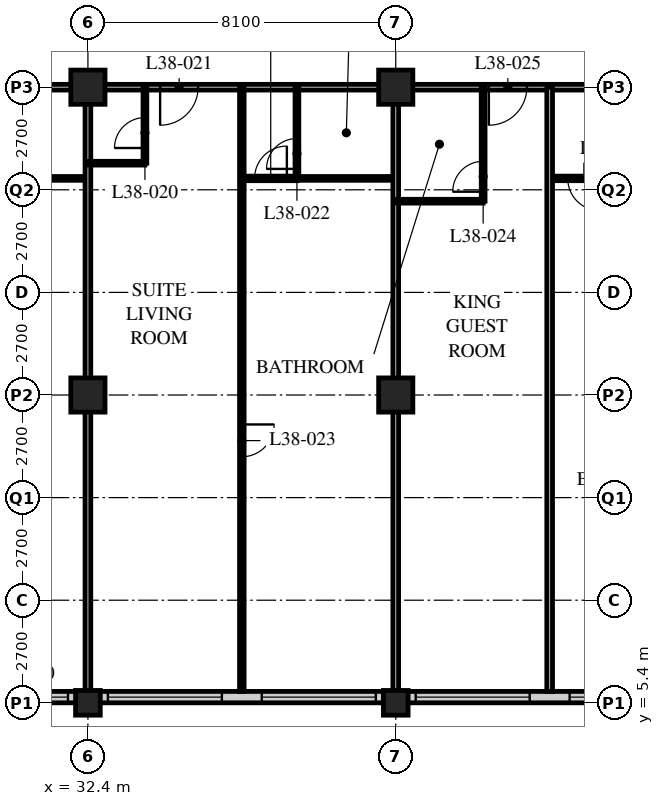
"""IFC4 building model, lengths in metres.
Left out: names, types, materials, properties, quantities, classifications, styles, units other than length and angle.
Written with IfcOpenShell. Run it as: python <this file> out.ifc"""

import sys

from ifc_helpers import new_model, si_unit, direction, frame, frame_2d, origin, origin_2d, place, context, subcontext, project, spatial, rectangle, hollow_rectangle, extrude, element, fill, save


model = new_model("IFC4")
c1 = context("Model", 3, precision=1e-05, world=origin(), true_north=direction((0.0, 1.0)))
c2 = subcontext(c1, "Body", "Model", "MODEL_VIEW")
j1 = project(units=[si_unit("LENGTHUNIT", "METRE"), si_unit("PLANEANGLEUNIT", "RADIAN")], contexts=[c1])
p1 = place(None, origin())
s1 = spatial("IfcSite", under=j1, at=p1, CompositionType="ELEMENT")
p2 = place(p1, origin())
s2 = spatial("IfcBuilding", under=s1, at=p2, CompositionType="ELEMENT")
p3 = place(p2, frame((0.0, 0.0, 147.6)))
s3 = spatial("IfcBuildingStorey", under=s2, at=p3, CompositionType="ELEMENT", Elevation=147.6)
p4 = place(p3, frame((32.4, 5.4, 0.0), z_axis=(0.0, 0.0, 1.0), x_axis=(1.0, 0.0, 0.0)))
e1 = element("IfcColumn", 1, at=p4, inside=s3, PredefinedType="COLUMN", context=c2, shape_type="SweptSolid", body=[
    extrude(hollow_rectangle(XDim=0.65, YDim=0.65, WallThickness=0.055, at=origin_2d()), origin(), (0.0, 0.0, 1.0), 3.4),
])
for number, where, z_axis, x_axis in (
    (2, (32.4, 13.5, 0.0), (0.0, 0.0, 1.0), (1.0, 0.0, 0.0)),
    (3, (32.4, 21.6, 0.0), (0.0, 0.0, 1.0), (1.0, 0.0, 0.0)),
):
    element("IfcColumn", number, at=place(p3, frame(where, z_axis=z_axis, x_axis=x_axis)), inside=s3, PredefinedType="COLUMN", context=c2, shape_type="SweptSolid", body=[
        extrude(hollow_rectangle(XDim=0.9, YDim=0.9, WallThickness=0.1, at=origin_2d()), origin(), (0.0, 0.0, 1.0), 3.4),
    ])
p5 = place(p3, frame((40.5, 5.4, 0.0), z_axis=(0.0, 0.0, 1.0), x_axis=(1.0, 0.0, 0.0)))
e4 = element("IfcColumn", 4, at=p5, inside=s3, PredefinedType="COLUMN", context=c2, shape_type="SweptSolid", body=[
    extrude(hollow_rectangle(XDim=0.65, YDim=0.65, WallThickness=0.055, at=origin_2d()), origin(), (0.0, 0.0, 1.0), 3.4),
])
for number, where, z_axis, x_axis in (
    (5, (40.5, 13.5, 0.0), (0.0, 0.0, 1.0), (1.0, 0.0, 0.0)),
    (6, (40.5, 21.6, 0.0), (0.0, 0.0, 1.0), (1.0, 0.0, 0.0)),
):
    element("IfcColumn", number, at=place(p3, frame(where, z_axis=z_axis, x_axis=x_axis)), inside=s3, PredefinedType="COLUMN", context=c2, shape_type="SweptSolid", body=[
        extrude(hollow_rectangle(XDim=0.9, YDim=0.9, WallThickness=0.1, at=origin_2d()), origin(), (0.0, 0.0, 1.0), 3.4),
    ])
p6 = place(p3, frame((8.4, 5.55, 0.0), z_axis=(0.0, 0.0, 1.0), x_axis=(1.0, 0.0, 0.0)))
e7 = element("IfcWall", 7, at=p6, inside=s3, PredefinedType="SOLIDWALL", context=c2, shape_type="SweptSolid", body=[
    extrude(rectangle(XDim=40.2, YDim=0.3, at=frame_2d((20.1, 0.0))), origin(), (0.0, 0.0, 1.0), 3.19),
])
p7 = place(p6, frame((0.225, 0.0, 0.9)))
e8 = element("IfcOpeningElement", 8, at=p7, cuts=e7, PredefinedType="OPENING", context=c2, shape_type="SweptSolid", body=[
    extrude(rectangle(XDim=3.0, YDim=1.4, at=frame_2d((1.5, 0.7))), frame((0.0, 0.16, 0.0), z_axis=(0.0, -1.0, 0.0), x_axis=(1.0, 0.0, 0.0)), (0.0, 0.0, 1.0), 0.32),
])
p8 = place(p6, frame((4.275, 0.0, 0.9)))
e9 = element("IfcOpeningElement", 9, at=p8, cuts=e7, PredefinedType="OPENING", context=c2, shape_type="SweptSolid", body=[
    extrude(rectangle(XDim=3.0, YDim=1.4, at=frame_2d((1.5, 0.7))), frame((0.0, 0.16, 0.0), z_axis=(0.0, -1.0, 0.0), x_axis=(1.0, 0.0, 0.0)), (0.0, 0.0, 1.0), 0.32),
])
p9 = place(p6, frame((8.325, 0.0, 0.9)))
e10 = element("IfcOpeningElement", 10, at=p9, cuts=e7, PredefinedType="OPENING", context=c2, shape_type="SweptSolid", body=[
    extrude(rectangle(XDim=3.0, YDim=1.4, at=frame_2d((1.5, 0.7))), frame((0.0, 0.16, 0.0), z_axis=(0.0, -1.0, 0.0), x_axis=(1.0, 0.0, 0.0)), (0.0, 0.0, 1.0), 0.32),
])
p10 = place(p6, frame((12.375, 0.0, 0.9)))
e11 = element("IfcOpeningElement", 11, at=p10, cuts=e7, PredefinedType="OPENING", context=c2, shape_type="SweptSolid", body=[
    extrude(rectangle(XDim=3.0, YDim=1.4, at=frame_2d((1.5, 0.7))), frame((0.0, 0.16, 0.0), z_axis=(0.0, -1.0, 0.0), x_axis=(1.0, 0.0, 0.0)), (0.0, 0.0, 1.0), 0.32),
])
p11 = place(p6, frame((16.425, 0.0, 0.9)))
e12 = element("IfcOpeningElement", 12, at=p11, cuts=e7, PredefinedType="OPENING", context=c2, shape_type="SweptSolid", body=[
    extrude(rectangle(XDim=3.0, YDim=1.4, at=frame_2d((1.5, 0.7))), frame((0.0, 0.16, 0.0), z_axis=(0.0, -1.0, 0.0), x_axis=(1.0, 0.0, 0.0)), (0.0, 0.0, 1.0), 0.32),
])
p12 = place(p6, frame((20.475, 0.0, 0.9)))
e13 = element("IfcOpeningElement", 13, at=p12, cuts=e7, PredefinedType="OPENING", context=c2, shape_type="SweptSolid", body=[
    extrude(rectangle(XDim=3.0, YDim=1.4, at=frame_2d((1.5, 0.7))), frame((0.0, 0.16, 0.0), z_axis=(0.0, -1.0, 0.0), x_axis=(1.0, 0.0, 0.0)), (0.0, 0.0, 1.0), 0.32),
])
p13 = place(p6, frame((24.525, 0.0, 0.9)))
e14 = element("IfcOpeningElement", 14, at=p13, cuts=e7, PredefinedType="OPENING", context=c2, shape_type="SweptSolid", body=[
    extrude(rectangle(XDim=3.0, YDim=1.4, at=frame_2d((1.5, 0.7))), frame((0.0, 0.16, 0.0), z_axis=(0.0, -1.0, 0.0), x_axis=(1.0, 0.0, 0.0)), (0.0, 0.0, 1.0), 0.32),
])
p14 = place(p6, frame((28.575, 0.0, 0.9)))
e15 = element("IfcOpeningElement", 15, at=p14, cuts=e7, PredefinedType="OPENING", context=c2, shape_type="SweptSolid", body=[
    extrude(rectangle(XDim=3.0, YDim=1.4, at=frame_2d((1.5, 0.7))), frame((0.0, 0.16, 0.0), z_axis=(0.0, -1.0, 0.0), x_axis=(1.0, 0.0, 0.0)), (0.0, 0.0, 1.0), 0.32),
])
p15 = place(p6, frame((32.625, 0.0, 0.9)))
e16 = element("IfcOpeningElement", 16, at=p15, cuts=e7, PredefinedType="OPENING", context=c2, shape_type="SweptSolid", body=[
    extrude(rectangle(XDim=3.0, YDim=1.4, at=frame_2d((1.5, 0.7))), frame((0.0, 0.16, 0.0), z_axis=(0.0, -1.0, 0.0), x_axis=(1.0, 0.0, 0.0)), (0.0, 0.0, 1.0), 0.32),
])
p16 = place(p6, frame((36.675, 0.0, 0.9)))
e17 = element("IfcOpeningElement", 17, at=p16, cuts=e7, PredefinedType="OPENING", context=c2, shape_type="SweptSolid", body=[
    extrude(rectangle(XDim=3.0, YDim=1.4, at=frame_2d((1.5, 0.7))), frame((0.0, 0.16, 0.0), z_axis=(0.0, -1.0, 0.0), x_axis=(1.0, 0.0, 0.0)), (0.0, 0.0, 1.0), 0.32),
])
p17 = place(p3, frame((12.15, 21.6, 0.0), z_axis=(0.0, 0.0, 1.0), x_axis=(1.0, 0.0, 0.0)))
e18 = element("IfcWall", 18, at=p17, inside=s3, PredefinedType="PARTITIONING", context=c2, shape_type="SweptSolid", body=[
    extrude(rectangle(XDim=36.45, YDim=0.15, at=frame_2d((18.225, 0.0))), origin(), (0.0, 0.0, 1.0), 2.42),
])
p18 = place(p17, frame((5.95, 0.0, 0.0)))
e19 = element("IfcOpeningElement", 19, at=p18, cuts=e18, PredefinedType="OPENING", context=c2, shape_type="SweptSolid", body=[
    extrude(rectangle(XDim=1.0, YDim=2.1, at=frame_2d((0.5, 1.05))), frame((0.0, 0.085, 0.0), z_axis=(0.0, -1.0, 0.0), x_axis=(1.0, 0.0, 0.0)), (0.0, 0.0, 1.0), 0.17),
])
p19 = place(p17, frame((14.05, 0.0, 0.0)))
e20 = element("IfcOpeningElement", 20, at=p19, cuts=e18, PredefinedType="OPENING", context=c2, shape_type="SweptSolid", body=[
    extrude(rectangle(XDim=1.0, YDim=2.1, at=frame_2d((0.5, 1.05))), frame((0.0, 0.085, 0.0), z_axis=(0.0, -1.0, 0.0), x_axis=(1.0, 0.0, 0.0)), (0.0, 0.0, 1.0), 0.17),
])
p20 = place(p17, frame((22.15, 0.0, 0.0)))
e21 = element("IfcOpeningElement", 21, at=p20, cuts=e18, PredefinedType="OPENING", context=c2, shape_type="SweptSolid", body=[
    extrude(rectangle(XDim=1.0, YDim=2.1, at=frame_2d((0.5, 1.05))), frame((0.0, 0.085, 0.0), z_axis=(0.0, -1.0, 0.0), x_axis=(1.0, 0.0, 0.0)), (0.0, 0.0, 1.0), 0.17),
])
p21 = place(p17, frame((30.8, 0.0, 0.0)))
e22 = element("IfcOpeningElement", 22, at=p21, cuts=e18, PredefinedType="OPENING", context=c2, shape_type="SweptSolid", body=[
    extrude(rectangle(XDim=1.0, YDim=2.1, at=frame_2d((0.5, 1.05))), frame((0.0, 0.085, 0.0), z_axis=(0.0, -1.0, 0.0), x_axis=(1.0, 0.0, 0.0)), (0.0, 0.0, 1.0), 0.17),
])
p22 = place(p17, frame((1.525, 0.0, 0.0)))
e23 = element("IfcOpeningElement", 23, at=p22, cuts=e18, PredefinedType="OPENING", context=c2, shape_type="SweptSolid", body=[
    extrude(rectangle(XDim=1.0, YDim=2.1, at=frame_2d((0.5, 1.05))), frame((0.0, 0.085, 0.0), z_axis=(0.0, -1.0, 0.0), x_axis=(1.0, 0.0, 0.0)), (0.0, 0.0, 1.0), 0.17),
])
p23 = place(p17, frame((33.925, 0.0, 0.0)))
e24 = element("IfcOpeningElement", 24, at=p23, cuts=e18, PredefinedType="OPENING", context=c2, shape_type="SweptSolid", body=[
    extrude(rectangle(XDim=1.0, YDim=2.1, at=frame_2d((0.5, 1.05))), frame((0.0, 0.085, 0.0), z_axis=(0.0, -1.0, 0.0), x_axis=(1.0, 0.0, 0.0)), (0.0, 0.0, 1.0), 0.17),
])
p24 = place(p3, frame((29.8, 19.2, 0.0), z_axis=(0.0, 0.0, 1.0), x_axis=(1.0, 0.0, 0.0)))
e25 = element("IfcWall", 25, at=p24, inside=s3, PredefinedType="PARTITIONING", context=c2, shape_type="SweptSolid", body=[
    extrude(rectangle(XDim=2.6, YDim=0.1, at=frame_2d((1.3, 0.0))), origin(), (0.0, 0.0, 1.0), 3.19),
])
p25 = place(p3, frame((32.4, 21.6, 0.0), z_axis=(0.0, 0.0, 1.0), x_axis=(0.0, -1.0, 0.0)))
e26 = element("IfcWall", 26, at=p25, inside=s3, PredefinedType="PARTITIONING", context=c2, shape_type="SweptSolid", body=[
    extrude(rectangle(XDim=15.9, YDim=0.15, at=frame_2d((7.95, 0.0))), origin(), (0.0, 0.0, 1.0), 2.42),
])
p26 = place(p3, frame((32.4, 19.6, 0.0), z_axis=(0.0, 0.0, 1.0), x_axis=(1.0, 0.0, 0.0)))
e27 = element("IfcWall", 27, at=p26, inside=s3, PredefinedType="PARTITIONING", context=c2, shape_type="SweptSolid", body=[
    extrude(rectangle(XDim=1.5, YDim=0.1, at=frame_2d((0.75, 0.0))), origin(), (0.0, 0.0, 1.0), 3.19),
])
p27 = place(p3, frame((33.9, 21.6, 0.0), z_axis=(0.0, 0.0, 1.0), x_axis=(0.0, -1.0, 0.0)))
e28 = element("IfcWall", 28, at=p27, inside=s3, PredefinedType="PARTITIONING", context=c2, shape_type="SweptSolid", body=[
    extrude(rectangle(XDim=2.0, YDim=0.1, at=frame_2d((1.0, 0.0))), origin(), (0.0, 0.0, 1.0), 3.19),
])
p28 = place(p27, frame((0.8, 0.0, 0.0)))
e29 = element("IfcOpeningElement", 29, at=p28, cuts=e28, PredefinedType="OPENING", context=c2, shape_type="SweptSolid", body=[
    extrude(rectangle(XDim=0.8, YDim=2.1, at=frame_2d((0.4, 1.05))), frame((0.0, 0.06, 0.0), z_axis=(0.0, -1.0, 0.0), x_axis=(1.0, 0.0, 0.0)), (0.0, 0.0, 1.0), 0.12),
])
p29 = place(p3, frame((37.9, 19.2, 0.0), z_axis=(0.0, 0.0, 1.0), x_axis=(1.0, 0.0, 0.0)))
e30 = element("IfcWall", 30, at=p29, inside=s3, PredefinedType="PARTITIONING", context=c2, shape_type="SweptSolid", body=[
    extrude(rectangle(XDim=2.6, YDim=0.1, at=frame_2d((1.3, 0.0))), origin(), (0.0, 0.0, 1.0), 3.19),
])
p30 = place(p3, frame((37.9, 21.6, 0.0), z_axis=(0.0, 0.0, 1.0), x_axis=(0.0, -1.0, 0.0)))
e31 = element("IfcWall", 31, at=p30, inside=s3, PredefinedType="PARTITIONING", context=c2, shape_type="SweptSolid", body=[
    extrude(rectangle(XDim=2.4, YDim=0.1, at=frame_2d((1.2, 0.0))), origin(), (0.0, 0.0, 1.0), 3.19),
])
p31 = place(p30, frame((1.35, 0.0, 0.0)))
e32 = element("IfcOpeningElement", 32, at=p31, cuts=e31, PredefinedType="OPENING", context=c2, shape_type="SweptSolid", body=[
    extrude(rectangle(XDim=0.8, YDim=2.1, at=frame_2d((0.4, 1.05))), frame((0.0, 0.06, 0.0), z_axis=(0.0, -1.0, 0.0), x_axis=(1.0, 0.0, 0.0)), (0.0, 0.0, 1.0), 0.12),
])
p32 = place(p3, frame((36.45, 21.6, 0.0), z_axis=(0.0, 0.0, 1.0), x_axis=(0.0, -1.0, 0.0)))
e33 = element("IfcWall", 33, at=p32, inside=s3, PredefinedType="PARTITIONING", context=c2, shape_type="SweptSolid", body=[
    extrude(rectangle(XDim=15.9, YDim=0.12, at=frame_2d((7.95, 0.0))), origin(), (0.0, 0.0, 1.0), 3.19),
])
p33 = place(p32, frame((8.875, 0.0, 0.0)))
e34 = element("IfcOpeningElement", 34, at=p33, cuts=e33, PredefinedType="OPENING", context=c2, shape_type="SweptSolid", body=[
    extrude(rectangle(XDim=0.85, YDim=2.1, at=frame_2d((0.425, 1.05))), frame((0.0, 0.07, 0.0), z_axis=(0.0, -1.0, 0.0), x_axis=(1.0, 0.0, 0.0)), (0.0, 0.0, 1.0), 0.14),
])
p34 = place(p3, frame((40.5, 21.6, 0.0), z_axis=(0.0, 0.0, 1.0), x_axis=(0.0, -1.0, 0.0)))
e35 = element("IfcWall", 35, at=p34, inside=s3, PredefinedType="PARTITIONING", context=c2, shape_type="SweptSolid", body=[
    extrude(rectangle(XDim=15.9, YDim=0.15, at=frame_2d((7.95, 0.0))), origin(), (0.0, 0.0, 1.0), 2.42),
])
p35 = place(p3, frame((40.5, 18.6, 0.0), z_axis=(0.0, 0.0, 1.0), x_axis=(1.0, 0.0, 0.0)))
e36 = element("IfcWall", 36, at=p35, inside=s3, PredefinedType="PARTITIONING", context=c2, shape_type="SweptSolid", body=[
    extrude(rectangle(XDim=2.3, YDim=0.1, at=frame_2d((1.15, 0.0))), origin(), (0.0, 0.0, 1.0), 3.19),
])
p36 = place(p3, frame((42.8, 21.6, 0.0), z_axis=(0.0, 0.0, 1.0), x_axis=(0.0, -1.0, 0.0)))
e37 = element("IfcWall", 37, at=p36, inside=s3, PredefinedType="PARTITIONING", context=c2, shape_type="SweptSolid", body=[
    extrude(rectangle(XDim=3.0, YDim=0.1, at=frame_2d((1.5, 0.0))), origin(), (0.0, 0.0, 1.0), 3.19),
])
p37 = place(p36, frame((1.95, 0.0, 0.0)))
e38 = element("IfcOpeningElement", 38, at=p37, cuts=e37, PredefinedType="OPENING", context=c2, shape_type="SweptSolid", body=[
    extrude(rectangle(XDim=0.8, YDim=2.1, at=frame_2d((0.4, 1.05))), frame((0.0, 0.06, 0.0), z_axis=(0.0, -1.0, 0.0), x_axis=(1.0, 0.0, 0.0)), (0.0, 0.0, 1.0), 0.12),
])
p38 = place(p3, frame((44.55, 19.2, 0.0), z_axis=(0.0, 0.0, 1.0), x_axis=(1.0, 0.0, 0.0)))
e39 = element("IfcWall", 39, at=p38, inside=s3, PredefinedType="PARTITIONING", context=c2, shape_type="SweptSolid", body=[
    extrude(rectangle(XDim=8.05, YDim=0.12, at=frame_2d((4.025, 0.0))), origin(), (0.0, 0.0, 1.0), 3.19),
])
p39 = place(p38, frame((0.475, 0.0, 0.0)))
e40 = element("IfcOpeningElement", 40, at=p39, cuts=e39, PredefinedType="OPENING", context=c2, shape_type="SweptSolid", body=[
    extrude(rectangle(XDim=0.85, YDim=2.1, at=frame_2d((0.425, 1.05))), frame((0.0, 0.07, 0.0), z_axis=(0.0, -1.0, 0.0), x_axis=(1.0, 0.0, 0.0)), (0.0, 0.0, 1.0), 0.14),
])
p40 = place(p38, frame((4.325, 0.0, 0.0)))
e41 = element("IfcOpeningElement", 41, at=p40, cuts=e39, PredefinedType="OPENING", context=c2, shape_type="SweptSolid", body=[
    extrude(rectangle(XDim=0.85, YDim=2.1, at=frame_2d((0.425, 1.05))), frame((0.0, 0.07, 0.0), z_axis=(0.0, -1.0, 0.0), x_axis=(1.0, 0.0, 0.0)), (0.0, 0.0, 1.0), 0.14),
])
p41 = place(p3, frame((44.55, 21.6, 0.0), z_axis=(0.0, 0.0, 1.0), x_axis=(0.0, -1.0, 0.0)))
e42 = element("IfcWall", 42, at=p41, inside=s3, PredefinedType="PARTITIONING", context=c2, shape_type="SweptSolid", body=[
    extrude(rectangle(XDim=15.9, YDim=0.15, at=frame_2d((7.95, 0.0))), origin(), (0.0, 0.0, 1.0), 3.19),
])
p42 = place(p3, frame((37.91, 19.2, 0.0), z_axis=(0.0, 0.0, 1.0), x_axis=(-1.0, 0.0, 0.0)))
e43 = element("IfcWall", 43, at=p42, inside=s3, PredefinedType="PARTITIONING", context=c2, shape_type="SweptSolid", body=[
    extrude(rectangle(XDim=1.46, YDim=0.12, at=frame_2d((0.73, 0.0))), origin(), (0.0, 0.0, 1.0), 3.19),
])
p43 = place(p42, frame((0.275, 0.0, 0.0)))
e44 = element("IfcOpeningElement", 44, at=p43, cuts=e43, PredefinedType="OPENING", context=c2, shape_type="SweptSolid", body=[
    extrude(rectangle(XDim=0.85, YDim=2.1, at=frame_2d((0.425, 1.05))), frame((0.0, 0.07, 0.0), z_axis=(0.0, -1.0, 0.0), x_axis=(1.0, 0.0, 0.0)), (0.0, 0.0, 1.0), 0.14),
])
p44 = place(p12, origin())
e45 = element("IfcWindow", 45, at=p44, inside=s3, PartitioningType="SINGLE_PANEL", PredefinedType="WINDOW", context=c2, shape_type="SweptSolid", body=[
    extrude(rectangle(XDim=3.0, YDim=1.4, at=frame_2d((1.5, 0.7))), frame((0.0, 0.03, 0.0), z_axis=(0.0, -1.0, 0.0), x_axis=(1.0, 0.0, 0.0)), (0.0, 0.0, 1.0), 0.06),
])
fill(e13, e45)
p45 = place(p13, origin())
e46 = element("IfcWindow", 46, at=p45, inside=s3, PartitioningType="SINGLE_PANEL", PredefinedType="WINDOW", context=c2, shape_type="SweptSolid", body=[
    extrude(rectangle(XDim=3.0, YDim=1.4, at=frame_2d((1.5, 0.7))), frame((0.0, 0.03, 0.0), z_axis=(0.0, -1.0, 0.0), x_axis=(1.0, 0.0, 0.0)), (0.0, 0.0, 1.0), 0.06),
])
fill(e14, e46)
p46 = place(p14, origin())
e47 = element("IfcWindow", 47, at=p46, inside=s3, PartitioningType="SINGLE_PANEL", PredefinedType="WINDOW", context=c2, shape_type="SweptSolid", body=[
    extrude(rectangle(XDim=3.0, YDim=1.4, at=frame_2d((1.5, 0.7))), frame((0.0, 0.03, 0.0), z_axis=(0.0, -1.0, 0.0), x_axis=(1.0, 0.0, 0.0)), (0.0, 0.0, 1.0), 0.06),
])
fill(e15, e47)
p47 = place(p15, origin())
e48 = element("IfcWindow", 48, at=p47, inside=s3, PartitioningType="SINGLE_PANEL", PredefinedType="WINDOW", context=c2, shape_type="SweptSolid", body=[
    extrude(rectangle(XDim=3.0, YDim=1.4, at=frame_2d((1.5, 0.7))), frame((0.0, 0.03, 0.0), z_axis=(0.0, -1.0, 0.0), x_axis=(1.0, 0.0, 0.0)), (0.0, 0.0, 1.0), 0.06),
])
fill(e16, e48)
p48 = place(p16, origin())
e49 = element("IfcWindow", 49, at=p48, inside=s3, PartitioningType="SINGLE_PANEL", PredefinedType="WINDOW", context=c2, shape_type="SweptSolid", body=[
    extrude(rectangle(XDim=3.0, YDim=1.4, at=frame_2d((1.5, 0.7))), frame((0.0, 0.03, 0.0), z_axis=(0.0, -1.0, 0.0), x_axis=(1.0, 0.0, 0.0)), (0.0, 0.0, 1.0), 0.06),
])
fill(e17, e49)
p49 = place(p28, origin())
e50 = element("IfcDoor", 50, at=p49, inside=s3, OperationType="SINGLE_SWING_LEFT", PredefinedType="DOOR", context=c2, shape_type="SweptSolid", body=[
    extrude(rectangle(XDim=0.8, YDim=2.1, at=frame_2d((0.4, 1.05))), frame((0.0, 0.025, 0.0), z_axis=(0.0, -1.0, 0.0), x_axis=(1.0, 0.0, 0.0)), (0.0, 0.0, 1.0), 0.05),
])
fill(e29, e50)
p50 = place(p20, origin())
e51 = element("IfcDoor", 51, at=p50, inside=s3, OperationType="SINGLE_SWING_RIGHT", PredefinedType="DOOR", context=c2, shape_type="SweptSolid", body=[
    extrude(rectangle(XDim=1.0, YDim=2.1, at=frame_2d((0.5, 1.05))), frame((0.0, 0.025, 0.0), z_axis=(0.0, -1.0, 0.0), x_axis=(1.0, 0.0, 0.0)), (0.0, 0.0, 1.0), 0.05),
])
fill(e21, e51)
p51 = place(p31, origin())
e52 = element("IfcDoor", 52, at=p51, inside=s3, OperationType="SINGLE_SWING_LEFT", PredefinedType="DOOR", context=c2, shape_type="SweptSolid", body=[
    extrude(rectangle(XDim=0.8, YDim=2.1, at=frame_2d((0.4, 1.05))), frame((0.0, 0.025, 0.0), z_axis=(0.0, -1.0, 0.0), x_axis=(1.0, 0.0, 0.0)), (0.0, 0.0, 1.0), 0.05),
])
fill(e32, e52)
p52 = place(p33, origin())
e53 = element("IfcDoor", 53, at=p52, inside=s3, OperationType="SINGLE_SWING_LEFT", PredefinedType="DOOR", context=c2, shape_type="SweptSolid", body=[
    extrude(rectangle(XDim=0.85, YDim=2.1, at=frame_2d((0.425, 1.05))), frame((0.0, 0.025, 0.0), z_axis=(0.0, -1.0, 0.0), x_axis=(1.0, 0.0, 0.0)), (0.0, 0.0, 1.0), 0.05),
])
fill(e34, e53)
p53 = place(p37, origin())
e54 = element("IfcDoor", 54, at=p53, inside=s3, OperationType="SINGLE_SWING_LEFT", PredefinedType="DOOR", context=c2, shape_type="SweptSolid", body=[
    extrude(rectangle(XDim=0.8, YDim=2.1, at=frame_2d((0.4, 1.05))), frame((0.0, 0.025, 0.0), z_axis=(0.0, -1.0, 0.0), x_axis=(1.0, 0.0, 0.0)), (0.0, 0.0, 1.0), 0.05),
])
fill(e38, e54)
p54 = place(p21, origin())
e55 = element("IfcDoor", 55, at=p54, inside=s3, OperationType="SINGLE_SWING_RIGHT", PredefinedType="DOOR", context=c2, shape_type="SweptSolid", body=[
    extrude(rectangle(XDim=1.0, YDim=2.1, at=frame_2d((0.5, 1.05))), frame((0.0, 0.025, 0.0), z_axis=(0.0, -1.0, 0.0), x_axis=(1.0, 0.0, 0.0)), (0.0, 0.0, 1.0), 0.05),
])
fill(e22, e55)
p55 = place(p39, origin())
e56 = element("IfcDoor", 56, at=p55, inside=s3, OperationType="SINGLE_SWING_LEFT", PredefinedType="DOOR", context=c2, shape_type="SweptSolid", body=[
    extrude(rectangle(XDim=0.85, YDim=2.1, at=frame_2d((0.425, 1.05))), frame((0.0, 0.025, 0.0), z_axis=(0.0, -1.0, 0.0), x_axis=(1.0, 0.0, 0.0)), (0.0, 0.0, 1.0), 0.05),
])
fill(e40, e56)
p56 = place(p43, origin())
e57 = element("IfcDoor", 57, at=p56, inside=s3, OperationType="SINGLE_SWING_RIGHT", PredefinedType="DOOR", context=c2, shape_type="SweptSolid", body=[
    extrude(rectangle(XDim=0.85, YDim=2.1, at=frame_2d((0.425, 1.05))), frame((0.0, 0.025, 0.0), z_axis=(0.0, -1.0, 0.0), x_axis=(1.0, 0.0, 0.0)), (0.0, 0.0, 1.0), 0.05),
])
fill(e44, e57)
save(model, sys.argv[1])
